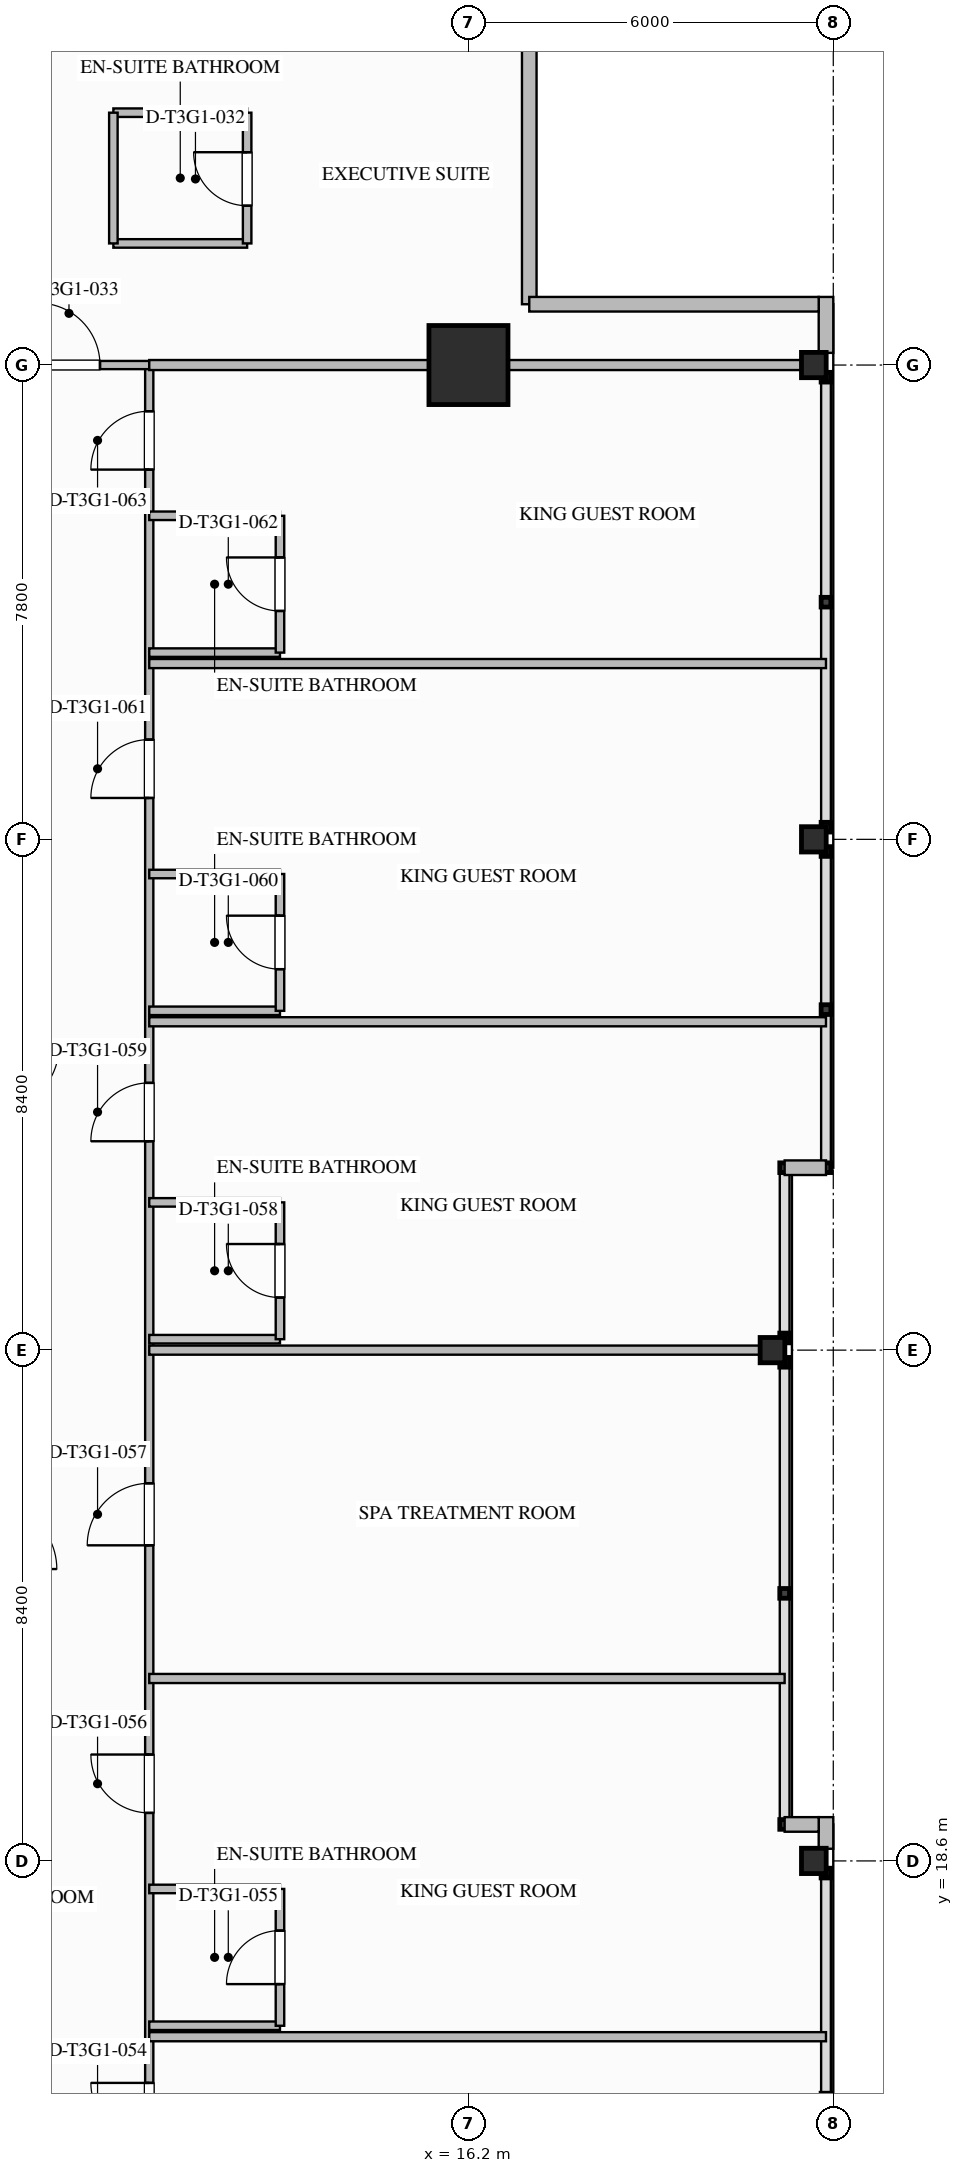
"""IFC4 building model, lengths in metres.
Left out: names, types, materials, properties, quantities, classifications, styles, units other than length and angle.
Written with IfcOpenShell. Run it as: python <this file> out.ifc"""

import sys

from ifc_helpers import new_model, si_unit, direction, frame, frame_2d, origin, origin_2d, place, context, subcontext, project, spatial, rectangle, i_section, extrude, element, fill, save


model = new_model("IFC4")
c1 = context("Model", 3, precision=1e-05, world=origin(), true_north=direction((0.0, 1.0)))
c2 = subcontext(c1, "Body", "Model", "MODEL_VIEW")
j1 = project(units=[si_unit("LENGTHUNIT", "METRE"), si_unit("PLANEANGLEUNIT", "RADIAN")], contexts=[c1])
p1 = place(None, origin())
s1 = spatial("IfcSite", under=j1, at=p1, CompositionType="ELEMENT")
p2 = place(p1, origin())
s2 = spatial("IfcBuilding", under=s1, at=p2, CompositionType="ELEMENT")
p3 = place(p2, frame((0.0, 0.0, 150.4)))
s3 = spatial("IfcBuildingStorey", under=s2, at=p3, CompositionType="ELEMENT", Elevation=150.4)
p4 = place(p3, frame((16.2, 43.2, 0.0), z_axis=(0.0, 0.0, 1.0), x_axis=(1.0, 0.0, 0.0)))
e1 = element("IfcColumn", 1, at=p4, inside=s3, PredefinedType="COLUMN", context=c2, shape_type="SweptSolid", body=[
    extrude(rectangle(XDim=1.3, YDim=1.3, at=origin_2d()), origin(), (0.0, 0.0, 1.0), 3.55),
])
for number, where, z_axis, x_axis in (
    (2, (21.88, 18.6, 0.0), (0.0, 0.0, 1.0), (1.0, 0.0, 0.0)),
    (3, (21.2, 27.0, 0.0), (0.0, 0.0, 1.0), (1.0, 0.0, 0.0)),
    (4, (21.88, 35.4, 0.0), (0.0, 0.0, 1.0), (1.0, 0.0, 0.0)),
    (5, (21.88, 43.2, 0.0), (0.0, 0.0, 1.0), (1.0, 0.0, 0.0)),
):
    element("IfcColumn", number, at=place(p3, frame(where, z_axis=z_axis, x_axis=x_axis)), inside=s3, PredefinedType="COLUMN", context=c2, shape_type="SweptSolid", body=[
        extrude(i_section(OverallWidth=0.406, OverallDepth=0.416, WebThickness=0.03, FlangeThickness=0.048, FilletRadius=0.028, at=origin_2d()), origin(), (0.0, 0.0, 1.0), 3.547),
    ])
p5 = place(p3, frame((22.08, 44.32, 0.0), z_axis=(0.0, 0.0, 1.0), x_axis=(0.0, -1.0, 0.0)))
e6 = element("IfcWall", 6, at=p5, inside=s3, PredefinedType="STANDARD", context=c2, shape_type="SweptSolid", body=[
    extrude(rectangle(XDim=0.92, YDim=0.24, at=frame_2d((0.46, 0.0))), origin(), (0.0, 0.0, 1.0), 3.29),
])
p6 = place(p3, frame((22.08, 19.32, 0.0), z_axis=(0.0, 0.0, 1.0), x_axis=(0.0, -1.0, 0.0)))
e7 = element("IfcWall", 7, at=p6, inside=s3, PredefinedType="STANDARD", context=c2, shape_type="SweptSolid", body=[
    extrude(rectangle(XDim=0.52, YDim=0.24, at=frame_2d((0.26, 0.0))), origin(), (0.0, 0.0, 1.0), 3.29),
])
for number, where, z_axis, x_axis in (
    (8, (17.2, 48.96, 0.0), (0.0, 0.0, 1.0), (0.0, -1.0, 0.0)),
    (9, (17.2, 44.2, 0.0), (0.0, 0.0, 1.0), (1.0, 0.0, 0.0)),
):
    element("IfcWall", number, at=place(p3, frame(where, z_axis=z_axis, x_axis=x_axis)), inside=s3, PredefinedType="STANDARD", context=c2, shape_type="SweptSolid", body=[
        extrude(rectangle(XDim=4.76, YDim=0.24, at=frame_2d((2.38, 0.0))), origin(), (0.0, 0.0, 1.0), 3.29),
    ])
p7 = place(p3, frame((22.08, 30.0, 0.0), z_axis=(0.0, 0.0, 1.0), x_axis=(-1.0, 0.0, 0.0)))
e10 = element("IfcWall", 10, at=p7, inside=s3, PredefinedType="STANDARD", context=c2, shape_type="SweptSolid", body=[
    extrude(rectangle(XDim=0.68, YDim=0.24, at=frame_2d((0.34, 0.0))), origin(), (0.0, 0.0, 1.0), 3.29),
])
p8 = place(p3, frame((21.4, 19.2, 0.0), z_axis=(0.0, 0.0, 1.0), x_axis=(1.0, 0.0, 0.0)))
e11 = element("IfcWall", 11, at=p8, inside=s3, PredefinedType="STANDARD", context=c2, shape_type="SweptSolid", body=[
    extrude(rectangle(XDim=0.56, YDim=0.24, at=frame_2d((0.28, 0.0))), origin(), (0.0, 0.0, 1.0), 3.29),
])
p9 = place(p3, frame((10.95, 10.8, 0.0), z_axis=(0.0, 0.0, 1.0), x_axis=(0.0, 1.0, 0.0)))
e12 = element("IfcWall", 12, at=p9, inside=s3, PredefinedType="PARTITIONING", context=c2, shape_type="SweptSolid", body=[
    extrude(rectangle(XDim=32.4, YDim=0.135, at=frame_2d((16.2, 0.0))), origin(), (0.0, 0.0, 1.0), 3.29),
])
p10 = place(p9, frame((3.189, 0.0, 0.0)))
e13 = element("IfcOpeningElement", 13, at=p10, cuts=e12, PredefinedType="OPENING", context=c2, shape_type="SweptSolid", body=[
    extrude(rectangle(XDim=0.96, YDim=2.15, at=frame_2d((0.48, 1.075))), frame((0.0, 0.077, 0.0), z_axis=(0.0, -1.0, 0.0), x_axis=(1.0, 0.0, 0.0)), (0.0, 0.0, 1.0), 0.155),
])
p11 = place(p9, frame((8.59, 0.0, 0.0)))
e14 = element("IfcOpeningElement", 14, at=p11, cuts=e12, PredefinedType="OPENING", context=c2, shape_type="SweptSolid", body=[
    extrude(rectangle(XDim=0.96, YDim=2.15, at=frame_2d((0.48, 1.075))), frame((0.0, 0.077, 0.0), z_axis=(0.0, -1.0, 0.0), x_axis=(1.0, 0.0, 0.0)), (0.0, 0.0, 1.0), 0.155),
])
p12 = place(p9, frame((12.99, 0.0, 0.0)))
e15 = element("IfcOpeningElement", 15, at=p12, cuts=e12, PredefinedType="OPENING", context=c2, shape_type="SweptSolid", body=[
    extrude(rectangle(XDim=1.02, YDim=2.15, at=frame_2d((0.51, 1.075))), frame((0.0, 0.077, 0.0), z_axis=(0.0, -1.0, 0.0), x_axis=(1.0, 0.0, 0.0)), (0.0, 0.0, 1.0), 0.155),
])
p13 = place(p9, frame((19.635, 0.0, 0.0)))
e16 = element("IfcOpeningElement", 16, at=p13, cuts=e12, PredefinedType="OPENING", context=c2, shape_type="SweptSolid", body=[
    extrude(rectangle(XDim=0.96, YDim=2.15, at=frame_2d((0.48, 1.075))), frame((0.0, 0.077, 0.0), z_axis=(0.0, -1.0, 0.0), x_axis=(1.0, 0.0, 0.0)), (0.0, 0.0, 1.0), 0.155),
])
p14 = place(p9, frame((25.281, 0.0, 0.0)))
e17 = element("IfcOpeningElement", 17, at=p14, cuts=e12, PredefinedType="OPENING", context=c2, shape_type="SweptSolid", body=[
    extrude(rectangle(XDim=0.96, YDim=2.15, at=frame_2d((0.48, 1.075))), frame((0.0, 0.077, 0.0), z_axis=(0.0, -1.0, 0.0), x_axis=(1.0, 0.0, 0.0)), (0.0, 0.0, 1.0), 0.155),
])
p15 = place(p9, frame((30.68, 0.0, 0.0)))
e18 = element("IfcOpeningElement", 18, at=p15, cuts=e12, PredefinedType="OPENING", context=c2, shape_type="SweptSolid", body=[
    extrude(rectangle(XDim=0.96, YDim=2.15, at=frame_2d((0.48, 1.075))), frame((0.0, 0.077, 0.0), z_axis=(0.0, -1.0, 0.0), x_axis=(1.0, 0.0, 0.0)), (0.0, 0.0, 1.0), 0.155),
])
p16 = place(p3, frame((8.6, 43.2, 0.0), z_axis=(0.0, 0.0, 1.0), x_axis=(1.0, 0.0, 0.0)))
e19 = element("IfcWall", 19, at=p16, inside=s3, PredefinedType="PARTITIONING", context=c2, shape_type="SweptSolid", body=[
    extrude(rectangle(XDim=2.35, YDim=0.135, at=frame_2d((1.175, 0.0))), origin(), (0.0, 0.0, 1.0), 2.58),
])
p17 = place(p16, frame((0.52, 0.0, 0.0)))
e20 = element("IfcOpeningElement", 20, at=p17, cuts=e19, PredefinedType="OPENING", context=c2, shape_type="SweptSolid", body=[
    extrude(rectangle(XDim=1.02, YDim=2.15, at=frame_2d((0.51, 1.075))), frame((0.0, 0.077, 0.0), z_axis=(0.0, -1.0, 0.0), x_axis=(1.0, 0.0, 0.0)), (0.0, 0.0, 1.0), 0.155),
])
p18 = place(p3, frame((10.95, 43.2, 0.0), z_axis=(0.0, 0.0, 1.0), x_axis=(1.0, 0.0, 0.0)))
e21 = element("IfcWall", 21, at=p18, inside=s3, PredefinedType="PARTITIONING", context=c2, shape_type="SweptSolid", body=[
    extrude(rectangle(XDim=11.13, YDim=0.165, at=frame_2d((5.565, 0.0))), origin(), (0.0, 0.0, 1.0), 2.58),
])
for number, where, z_axis, x_axis in (
    (22, (10.36, 45.2, 0.0), (0.0, 0.0, 1.0), (1.0, 0.0, 0.0)),
    (23, (10.36, 47.35, 0.0), (0.0, 0.0, 1.0), (1.0, 0.0, 0.0)),
):
    element("IfcWall", number, at=place(p3, frame(where, z_axis=z_axis, x_axis=x_axis)), inside=s3, PredefinedType="PLUMBINGWALL", context=c2, shape_type="SweptSolid", body=[
        extrude(rectangle(XDim=2.2, YDim=0.14, at=frame_2d((1.1, 0.0))), origin(), (0.0, 0.0, 1.0), 3.29),
    ])
p19 = place(p3, frame((10.36, 45.2, 0.0), z_axis=(0.0, 0.0, 1.0), x_axis=(0.0, 1.0, 0.0)))
e24 = element("IfcWall", 24, at=p19, inside=s3, PredefinedType="PLUMBINGWALL", context=c2, shape_type="SweptSolid", body=[
    extrude(rectangle(XDim=2.15, YDim=0.14, at=frame_2d((1.075, 0.0))), origin(), (0.0, 0.0, 1.0), 3.29),
])
p20 = place(p3, frame((12.56, 45.2, 0.0), z_axis=(0.0, 0.0, 1.0), x_axis=(0.0, 1.0, 0.0)))
e25 = element("IfcWall", 25, at=p20, inside=s3, PredefinedType="PLUMBINGWALL", context=c2, shape_type="SweptSolid", body=[
    extrude(rectangle(XDim=2.15, YDim=0.14, at=frame_2d((1.075, 0.0))), origin(), (0.0, 0.0, 1.0), 3.29),
])
p21 = place(p20, frame((0.62, 0.0, 0.0)))
e26 = element("IfcOpeningElement", 26, at=p21, cuts=e25, PredefinedType="OPENING", context=c2, shape_type="SweptSolid", body=[
    extrude(rectangle(XDim=0.88, YDim=2.1, at=frame_2d((0.44, 1.05))), frame((0.0, 0.08, 0.0), z_axis=(0.0, -1.0, 0.0), x_axis=(1.0, 0.0, 0.0)), (0.0, 0.0, 1.0), 0.16),
])
p22 = place(p3, frame((10.95, 15.709, 0.0), z_axis=(0.0, 0.0, 1.0), x_axis=(1.0, 0.0, 0.0)))
e27 = element("IfcWall", 27, at=p22, inside=s3, PredefinedType="PARTITIONING", context=c2, shape_type="SweptSolid", body=[
    extrude(rectangle(XDim=11.13, YDim=0.15, at=frame_2d((5.565, 0.0))), origin(), (0.0, 0.0, 1.0), 3.29),
])
for number, where, z_axis, x_axis in (
    (28, (10.95, 15.889, 0.0), (0.0, 0.0, 1.0), (1.0, 0.0, 0.0)),
    (29, (10.95, 18.139, 0.0), (0.0, 0.0, 1.0), (1.0, 0.0, 0.0)),
):
    element("IfcWall", number, at=place(p3, frame(where, z_axis=z_axis, x_axis=x_axis)), inside=s3, PredefinedType="PLUMBINGWALL", context=c2, shape_type="SweptSolid", body=[
        extrude(rectangle(XDim=2.15, YDim=0.14, at=frame_2d((1.075, 0.0))), origin(), (0.0, 0.0, 1.0), 3.29),
    ])
p23 = place(p3, frame((13.1, 15.889, 0.0), z_axis=(0.0, 0.0, 1.0), x_axis=(0.0, 1.0, 0.0)))
e30 = element("IfcWall", 30, at=p23, inside=s3, PredefinedType="PLUMBINGWALL", context=c2, shape_type="SweptSolid", body=[
    extrude(rectangle(XDim=2.25, YDim=0.14, at=frame_2d((1.125, 0.0))), origin(), (0.0, 0.0, 1.0), 3.29),
])
p24 = place(p23, frame((0.685, 0.0, 0.0)))
e31 = element("IfcOpeningElement", 31, at=p24, cuts=e30, PredefinedType="OPENING", context=c2, shape_type="SweptSolid", body=[
    extrude(rectangle(XDim=0.88, YDim=2.1, at=frame_2d((0.44, 1.05))), frame((0.0, 0.08, 0.0), z_axis=(0.0, -1.0, 0.0), x_axis=(1.0, 0.0, 0.0)), (0.0, 0.0, 1.0), 0.16),
])
p25 = place(p3, frame((10.95, 21.6, 0.0), z_axis=(0.0, 0.0, 1.0), x_axis=(1.0, 0.0, 0.0)))
e32 = element("IfcWall", 32, at=p25, inside=s3, PredefinedType="PARTITIONING", context=c2, shape_type="SweptSolid", body=[
    extrude(rectangle(XDim=10.45, YDim=0.15, at=frame_2d((5.225, 0.0))), origin(), (0.0, 0.0, 1.0), 3.29),
])
p26 = place(p3, frame((10.95, 27.0, 0.0), z_axis=(0.0, 0.0, 1.0), x_axis=(1.0, 0.0, 0.0)))
e33 = element("IfcWall", 33, at=p26, inside=s3, PredefinedType="PARTITIONING", context=c2, shape_type="SweptSolid", body=[
    extrude(rectangle(XDim=10.45, YDim=0.15, at=frame_2d((5.225, 0.0))), origin(), (0.0, 0.0, 1.0), 2.58),
])
p27 = place(p3, frame((10.95, 27.18, 0.0), z_axis=(0.0, 0.0, 1.0), x_axis=(1.0, 0.0, 0.0)))
e34 = element("IfcWall", 34, at=p27, inside=s3, PredefinedType="PLUMBINGWALL", context=c2, shape_type="SweptSolid", body=[
    extrude(rectangle(XDim=2.15, YDim=0.14, at=frame_2d((1.075, 0.0))), origin(), (0.0, 0.0, 1.0), 2.667),
])
p28 = place(p3, frame((10.95, 29.43, 0.0), z_axis=(0.0, 0.0, 1.0), x_axis=(1.0, 0.0, 0.0)))
e35 = element("IfcWall", 35, at=p28, inside=s3, PredefinedType="PLUMBINGWALL", context=c2, shape_type="SweptSolid", body=[
    extrude(rectangle(XDim=2.15, YDim=0.14, at=frame_2d((1.075, 0.0))), origin(), (0.0, 0.0, 1.0), 3.29),
])
p29 = place(p3, frame((13.1, 27.18, 0.0), z_axis=(0.0, 0.0, 1.0), x_axis=(0.0, 1.0, 0.0)))
e36 = element("IfcWall", 36, at=p29, inside=s3, PredefinedType="PLUMBINGWALL", context=c2, shape_type="SweptSolid", body=[
    extrude(rectangle(XDim=2.25, YDim=0.14, at=frame_2d((1.125, 0.0))), origin(), (0.0, 0.0, 1.0), 3.29),
])
p30 = place(p29, frame((0.685, 0.0, 0.0)))
e37 = element("IfcOpeningElement", 37, at=p30, cuts=e36, PredefinedType="OPENING", context=c2, shape_type="SweptSolid", body=[
    extrude(rectangle(XDim=0.88, YDim=2.1, at=frame_2d((0.44, 1.05))), frame((0.0, 0.08, 0.0), z_axis=(0.0, -1.0, 0.0), x_axis=(1.0, 0.0, 0.0)), (0.0, 0.0, 1.0), 0.16),
])
p31 = place(p3, frame((10.95, 32.4, 0.0), z_axis=(0.0, 0.0, 1.0), x_axis=(1.0, 0.0, 0.0)))
e38 = element("IfcWall", 38, at=p31, inside=s3, PredefinedType="PARTITIONING", context=c2, shape_type="SweptSolid", body=[
    extrude(rectangle(XDim=11.13, YDim=0.15, at=frame_2d((5.565, 0.0))), origin(), (0.0, 0.0, 1.0), 3.29),
])
for number, where, z_axis, x_axis in (
    (39, (10.95, 32.58, 0.0), (0.0, 0.0, 1.0), (1.0, 0.0, 0.0)),
    (40, (10.95, 34.83, 0.0), (0.0, 0.0, 1.0), (1.0, 0.0, 0.0)),
):
    element("IfcWall", number, at=place(p3, frame(where, z_axis=z_axis, x_axis=x_axis)), inside=s3, PredefinedType="PLUMBINGWALL", context=c2, shape_type="SweptSolid", body=[
        extrude(rectangle(XDim=2.15, YDim=0.14, at=frame_2d((1.075, 0.0))), origin(), (0.0, 0.0, 1.0), 3.29),
    ])
p32 = place(p3, frame((13.1, 32.58, 0.0), z_axis=(0.0, 0.0, 1.0), x_axis=(0.0, 1.0, 0.0)))
e41 = element("IfcWall", 41, at=p32, inside=s3, PredefinedType="PLUMBINGWALL", context=c2, shape_type="SweptSolid", body=[
    extrude(rectangle(XDim=2.25, YDim=0.14, at=frame_2d((1.125, 0.0))), origin(), (0.0, 0.0, 1.0), 3.29),
])
p33 = place(p32, frame((0.685, 0.0, 0.0)))
e42 = element("IfcOpeningElement", 42, at=p33, cuts=e41, PredefinedType="OPENING", context=c2, shape_type="SweptSolid", body=[
    extrude(rectangle(XDim=0.88, YDim=2.1, at=frame_2d((0.44, 1.05))), frame((0.0, 0.08, 0.0), z_axis=(0.0, -1.0, 0.0), x_axis=(1.0, 0.0, 0.0)), (0.0, 0.0, 1.0), 0.16),
])
p34 = place(p3, frame((10.95, 38.291, 0.0), z_axis=(0.0, 0.0, 1.0), x_axis=(1.0, 0.0, 0.0)))
e43 = element("IfcWall", 43, at=p34, inside=s3, PredefinedType="PARTITIONING", context=c2, shape_type="SweptSolid", body=[
    extrude(rectangle(XDim=11.13, YDim=0.15, at=frame_2d((5.565, 0.0))), origin(), (0.0, 0.0, 1.0), 3.29),
])
for number, where, z_axis, x_axis in (
    (44, (10.95, 38.471, 0.0), (0.0, 0.0, 1.0), (1.0, 0.0, 0.0)),
    (45, (10.95, 40.721, 0.0), (0.0, 0.0, 1.0), (1.0, 0.0, 0.0)),
):
    element("IfcWall", number, at=place(p3, frame(where, z_axis=z_axis, x_axis=x_axis)), inside=s3, PredefinedType="PLUMBINGWALL", context=c2, shape_type="SweptSolid", body=[
        extrude(rectangle(XDim=2.15, YDim=0.14, at=frame_2d((1.075, 0.0))), origin(), (0.0, 0.0, 1.0), 3.29),
    ])
p35 = place(p3, frame((13.1, 38.471, 0.0), z_axis=(0.0, 0.0, 1.0), x_axis=(0.0, 1.0, 0.0)))
e46 = element("IfcWall", 46, at=p35, inside=s3, PredefinedType="PLUMBINGWALL", context=c2, shape_type="SweptSolid", body=[
    extrude(rectangle(XDim=2.25, YDim=0.14, at=frame_2d((1.125, 0.0))), origin(), (0.0, 0.0, 1.0), 3.29),
])
p36 = place(p35, frame((0.685, 0.0, 0.0)))
e47 = element("IfcOpeningElement", 47, at=p36, cuts=e46, PredefinedType="OPENING", context=c2, shape_type="SweptSolid", body=[
    extrude(rectangle(XDim=0.88, YDim=2.1, at=frame_2d((0.44, 1.05))), frame((0.0, 0.08, 0.0), z_axis=(0.0, -1.0, 0.0), x_axis=(1.0, 0.0, 0.0)), (0.0, 0.0, 1.0), 0.16),
])
p37 = place(p21, origin())
e48 = element("IfcDoor", 48, at=p37, inside=s3, OperationType="SINGLE_SWING_RIGHT", PredefinedType="DOOR", context=c2, shape_type="SweptSolid", body=[
    extrude(rectangle(XDim=0.88, YDim=2.1, at=frame_2d((0.44, 1.05))), frame((0.0, 0.025, 0.0), z_axis=(0.0, -1.0, 0.0), x_axis=(1.0, 0.0, 0.0)), (0.0, 0.0, 1.0), 0.05),
])
fill(e26, e48)
p38 = place(p17, origin())
e49 = element("IfcDoor", 49, at=p38, inside=s3, OperationType="SINGLE_SWING_LEFT", PredefinedType="DOOR", context=c2, shape_type="SweptSolid", body=[
    extrude(rectangle(XDim=1.02, YDim=2.15, at=frame_2d((0.51, 1.075))), frame((0.0, 0.025, 0.0), z_axis=(0.0, -1.0, 0.0), x_axis=(1.0, 0.0, 0.0)), (0.0, 0.0, 1.0), 0.05),
])
fill(e20, e49)
p39 = place(p10, origin())
e50 = element("IfcDoor", 50, at=p39, inside=s3, OperationType="SINGLE_SWING_RIGHT", PredefinedType="DOOR", context=c2, shape_type="SweptSolid", body=[
    extrude(rectangle(XDim=0.96, YDim=2.15, at=frame_2d((0.48, 1.075))), frame((0.0, 0.025, 0.0), z_axis=(0.0, -1.0, 0.0), x_axis=(1.0, 0.0, 0.0)), (0.0, 0.0, 1.0), 0.05),
])
fill(e13, e50)
p40 = place(p24, origin())
e51 = element("IfcDoor", 51, at=p40, inside=s3, OperationType="SINGLE_SWING_LEFT", PredefinedType="DOOR", context=c2, shape_type="SweptSolid", body=[
    extrude(rectangle(XDim=0.88, YDim=2.1, at=frame_2d((0.44, 1.05))), frame((0.0, 0.025, 0.0), z_axis=(0.0, -1.0, 0.0), x_axis=(1.0, 0.0, 0.0)), (0.0, 0.0, 1.0), 0.05),
])
fill(e31, e51)
p41 = place(p11, origin())
e52 = element("IfcDoor", 52, at=p41, inside=s3, OperationType="SINGLE_SWING_RIGHT", PredefinedType="DOOR", context=c2, shape_type="SweptSolid", body=[
    extrude(rectangle(XDim=0.96, YDim=2.15, at=frame_2d((0.48, 1.075))), frame((0.0, 0.025, 0.0), z_axis=(0.0, -1.0, 0.0), x_axis=(1.0, 0.0, 0.0)), (0.0, 0.0, 1.0), 0.05),
])
fill(e14, e52)
p42 = place(p12, origin())
e53 = element("IfcDoor", 53, at=p42, inside=s3, OperationType="SINGLE_SWING_LEFT", PredefinedType="DOOR", context=c2, shape_type="SweptSolid", body=[
    extrude(rectangle(XDim=1.02, YDim=2.15, at=frame_2d((0.51, 1.075))), frame((0.0, 0.025, 0.0), z_axis=(0.0, -1.0, 0.0), x_axis=(1.0, 0.0, 0.0)), (0.0, 0.0, 1.0), 0.05),
])
fill(e15, e53)
p43 = place(p30, origin())
e54 = element("IfcDoor", 54, at=p43, inside=s3, OperationType="SINGLE_SWING_RIGHT", PredefinedType="DOOR", context=c2, shape_type="SweptSolid", body=[
    extrude(rectangle(XDim=0.88, YDim=2.1, at=frame_2d((0.44, 1.05))), frame((0.0, 0.025, 0.0), z_axis=(0.0, -1.0, 0.0), x_axis=(1.0, 0.0, 0.0)), (0.0, 0.0, 1.0), 0.05),
])
fill(e37, e54)
p44 = place(p13, origin())
e55 = element("IfcDoor", 55, at=p44, inside=s3, OperationType="SINGLE_SWING_LEFT", PredefinedType="DOOR", context=c2, shape_type="SweptSolid", body=[
    extrude(rectangle(XDim=0.96, YDim=2.15, at=frame_2d((0.48, 1.075))), frame((0.0, 0.025, 0.0), z_axis=(0.0, -1.0, 0.0), x_axis=(1.0, 0.0, 0.0)), (0.0, 0.0, 1.0), 0.05),
])
fill(e16, e55)
p45 = place(p33, origin())
e56 = element("IfcDoor", 56, at=p45, inside=s3, OperationType="SINGLE_SWING_RIGHT", PredefinedType="DOOR", context=c2, shape_type="SweptSolid", body=[
    extrude(rectangle(XDim=0.88, YDim=2.1, at=frame_2d((0.44, 1.05))), frame((0.0, 0.025, 0.0), z_axis=(0.0, -1.0, 0.0), x_axis=(1.0, 0.0, 0.0)), (0.0, 0.0, 1.0), 0.05),
])
fill(e42, e56)
p46 = place(p14, origin())
e57 = element("IfcDoor", 57, at=p46, inside=s3, OperationType="SINGLE_SWING_LEFT", PredefinedType="DOOR", context=c2, shape_type="SweptSolid", body=[
    extrude(rectangle(XDim=0.96, YDim=2.15, at=frame_2d((0.48, 1.075))), frame((0.0, 0.025, 0.0), z_axis=(0.0, -1.0, 0.0), x_axis=(1.0, 0.0, 0.0)), (0.0, 0.0, 1.0), 0.05),
])
fill(e17, e57)
p47 = place(p36, origin())
e58 = element("IfcDoor", 58, at=p47, inside=s3, OperationType="SINGLE_SWING_RIGHT", PredefinedType="DOOR", context=c2, shape_type="SweptSolid", body=[
    extrude(rectangle(XDim=0.88, YDim=2.1, at=frame_2d((0.44, 1.05))), frame((0.0, 0.025, 0.0), z_axis=(0.0, -1.0, 0.0), x_axis=(1.0, 0.0, 0.0)), (0.0, 0.0, 1.0), 0.05),
])
fill(e47, e58)
p48 = place(p15, origin())
e59 = element("IfcDoor", 59, at=p48, inside=s3, OperationType="SINGLE_SWING_LEFT", PredefinedType="DOOR", context=c2, shape_type="SweptSolid", body=[
    extrude(rectangle(XDim=0.96, YDim=2.15, at=frame_2d((0.48, 1.075))), frame((0.0, 0.025, 0.0), z_axis=(0.0, -1.0, 0.0), x_axis=(1.0, 0.0, 0.0)), (0.0, 0.0, 1.0), 0.05),
])
fill(e18, e59)
save(model, sys.argv[1])
